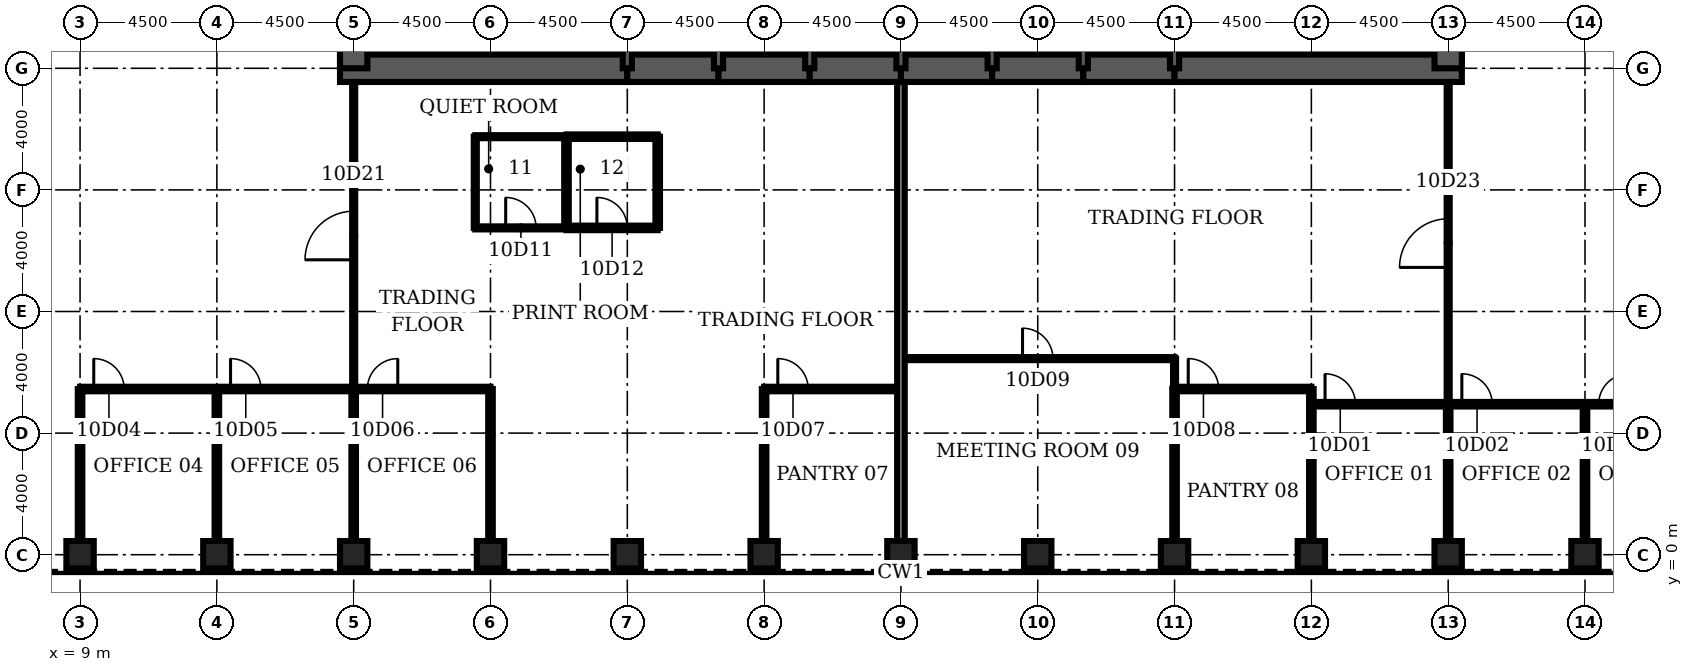
"""IFC4 building model, lengths in metres.
Left out: names, types, materials, properties, quantities, classifications, styles, units other than length and angle.
Written with IfcOpenShell. Run it as: python <this file> out.ifc"""

import sys

from ifc_helpers import new_model, si_unit, direction, frame, frame_2d, origin, origin_2d, place, context, subcontext, project, spatial, rectangle, hollow_rectangle, extrude, element, fill, save


model = new_model("IFC4")
c1 = context("Model", 3, precision=1e-05, world=origin(), true_north=direction((0.0, 1.0)))
c2 = subcontext(c1, "Body", "Model", "MODEL_VIEW")
j1 = project(units=[si_unit("LENGTHUNIT", "METRE"), si_unit("PLANEANGLEUNIT", "RADIAN")], contexts=[c1])
p1 = place(None, origin())
s1 = spatial("IfcSite", under=j1, at=p1, CompositionType="ELEMENT")
p2 = place(p1, origin())
s2 = spatial("IfcBuilding", under=s1, at=p2, CompositionType="ELEMENT")
p3 = place(p2, frame((0.0, 0.0, 50.0)))
s3 = spatial("IfcBuildingStorey", under=s2, at=p3, CompositionType="ELEMENT", Elevation=50.0)
for number, where, z_axis, x_axis in (
    (1, (9.0, 0.0, 0.0), (0.0, 0.0, 1.0), (0.0, 1.0, 0.0)),
    (2, (13.5, 0.0, 0.0), (0.0, 0.0, 1.0), (0.0, 1.0, 0.0)),
    (3, (18.0, 0.0, 0.0), (0.0, 0.0, 1.0), (0.0, 1.0, 0.0)),
    (4, (22.5, 0.0, 0.0), (0.0, 0.0, 1.0), (0.0, 1.0, 0.0)),
    (5, (27.0, 0.0, 0.0), (0.0, 0.0, 1.0), (0.0, 1.0, 0.0)),
    (6, (31.5, 0.0, 0.0), (0.0, 0.0, 1.0), (0.0, 1.0, 0.0)),
    (7, (36.0, 0.0, 0.0), (0.0, 0.0, 1.0), (0.0, 1.0, 0.0)),
    (8, (40.5, 0.0, 0.0), (0.0, 0.0, 1.0), (0.0, 1.0, 0.0)),
    (9, (45.0, 0.0, 0.0), (0.0, 0.0, 1.0), (0.0, 1.0, 0.0)),
    (10, (49.5, 0.0, 0.0), (0.0, 0.0, 1.0), (0.0, 1.0, 0.0)),
    (11, (54.0, 0.0, 0.0), (0.0, 0.0, 1.0), (0.0, 1.0, 0.0)),
    (12, (58.5, 0.0, 0.0), (0.0, 0.0, 1.0), (0.0, 1.0, 0.0)),
):
    element("IfcColumn", number, at=place(p3, frame(where, z_axis=z_axis, x_axis=x_axis)), inside=s3, PredefinedType="COLUMN", context=c2, shape_type="SweptSolid", body=[
        extrude(hollow_rectangle(XDim=0.9, YDim=0.9, WallThickness=0.12, at=origin_2d()), origin(), (0.0, 0.0, 1.0), 4.5),
    ])
p4 = place(p3, frame((17.55, 16.0, 0.0), z_axis=(0.0, 0.0, 1.0), x_axis=(1.0, 0.0, 0.0)))
e13 = element("IfcWall", 13, at=p4, inside=s3, PredefinedType="SHEAR", context=c2, shape_type="SweptSolid", body=[
    extrude(rectangle(XDim=9.45, YDim=0.9, at=frame_2d((4.725, 0.0))), origin(), (0.0, 0.0, 1.0), 4.5),
])
for number, where, z_axis, x_axis in (
    (14, (27.0, 16.0, 0.0), (0.0, 0.0, 1.0), (1.0, 0.0, 0.0)),
    (15, (30.0, 16.0, 0.0), (0.0, 0.0, 1.0), (1.0, 0.0, 0.0)),
    (16, (33.0, 16.0, 0.0), (0.0, 0.0, 1.0), (1.0, 0.0, 0.0)),
    (17, (36.0, 16.0, 0.0), (0.0, 0.0, 1.0), (1.0, 0.0, 0.0)),
    (18, (39.0, 16.0, 0.0), (0.0, 0.0, 1.0), (1.0, 0.0, 0.0)),
    (19, (42.0, 16.0, 0.0), (0.0, 0.0, 1.0), (1.0, 0.0, 0.0)),
):
    element("IfcWall", number, at=place(p3, frame(where, z_axis=z_axis, x_axis=x_axis)), inside=s3, PredefinedType="SHEAR", context=c2, shape_type="SweptSolid", body=[
        extrude(rectangle(XDim=3.0, YDim=0.9, at=frame_2d((1.5, 0.0))), origin(), (0.0, 0.0, 1.0), 4.5),
    ])
p5 = place(p3, frame((45.0, 16.0, 0.0), z_axis=(0.0, 0.0, 1.0), x_axis=(1.0, 0.0, 0.0)))
e20 = element("IfcWall", 20, at=p5, inside=s3, PredefinedType="SHEAR", context=c2, shape_type="SweptSolid", body=[
    extrude(rectangle(XDim=9.45, YDim=0.9, at=frame_2d((4.725, 0.0))), origin(), (0.0, 0.0, 1.0), 4.5),
])
for number, where, z_axis, x_axis in (
    (21, (18.0, 19.2, 0.0), (0.0, 0.0, 1.0), (0.0, -1.0, 0.0)),
    (22, (54.0, 16.0, 0.0), (0.0, 0.0, 1.0), (0.0, 1.0, 0.0)),
):
    element("IfcWall", number, at=place(p3, frame(where, z_axis=z_axis, x_axis=x_axis)), inside=s3, PredefinedType="SHEAR", context=c2, shape_type="SweptSolid", body=[
        extrude(rectangle(XDim=3.2, YDim=0.9, at=frame_2d((1.6, 0.0))), origin(), (0.0, 0.0, 1.0), 4.5),
    ])
for number, where, z_axis, x_axis in (
    (23, (27.0, 16.0, 0.0), (0.0, 0.0, 1.0), (0.0, 1.0, 0.0)),
    (24, (30.0, 16.0, 0.0), (0.0, 0.0, 1.0), (0.0, 1.0, 0.0)),
    (25, (33.0, 16.0, 0.0), (0.0, 0.0, 1.0), (0.0, 1.0, 0.0)),
    (26, (36.0, 16.0, 0.0), (0.0, 0.0, 1.0), (0.0, 1.0, 0.0)),
    (27, (39.0, 16.0, 0.0), (0.0, 0.0, 1.0), (0.0, 1.0, 0.0)),
    (28, (42.0, 16.0, 0.0), (0.0, 0.0, 1.0), (0.0, 1.0, 0.0)),
    (29, (45.0, 16.0, 0.0), (0.0, 0.0, 1.0), (0.0, 1.0, 0.0)),
):
    element("IfcWall", number, at=place(p3, frame(where, z_axis=z_axis, x_axis=x_axis)), inside=s3, PredefinedType="SOLIDWALL", context=c2, shape_type="SweptSolid", body=[
        extrude(rectangle(XDim=3.2, YDim=0.3, at=frame_2d((1.6, 0.0))), origin(), (0.0, 0.0, 1.0), 4.5),
    ])
p6 = place(p3, frame((49.5, 4.95, 0.0), z_axis=(0.0, 0.0, 1.0), x_axis=(1.0, 0.0, 0.0)))
e30 = element("IfcWall", 30, at=p6, inside=s3, PredefinedType="PARTITIONING", context=c2, shape_type="SweptSolid", body=[
    extrude(rectangle(XDim=13.5, YDim=0.15, at=frame_2d((6.75, 0.0))), origin(), (0.0, 0.0, 1.0), 3.0),
])
p7 = place(p6, frame((0.45, 0.0, 0.0)))
e31 = element("IfcOpeningElement", 31, at=p7, cuts=e30, PredefinedType="OPENING", context=c2, shape_type="SweptSolid", body=[
    extrude(rectangle(XDim=1.0, YDim=2.1, at=frame_2d((0.5, 1.05))), frame((0.0, 0.085, 0.0), z_axis=(0.0, -1.0, 0.0), x_axis=(1.0, 0.0, 0.0)), (0.0, 0.0, 1.0), 0.17),
])
p8 = place(p6, frame((4.95, 0.0, 0.0)))
e32 = element("IfcOpeningElement", 32, at=p8, cuts=e30, PredefinedType="OPENING", context=c2, shape_type="SweptSolid", body=[
    extrude(rectangle(XDim=1.0, YDim=2.1, at=frame_2d((0.5, 1.05))), frame((0.0, 0.085, 0.0), z_axis=(0.0, -1.0, 0.0), x_axis=(1.0, 0.0, 0.0)), (0.0, 0.0, 1.0), 0.17),
])
p9 = place(p6, frame((9.45, 0.0, 0.0)))
e33 = element("IfcOpeningElement", 33, at=p9, cuts=e30, PredefinedType="OPENING", context=c2, shape_type="SweptSolid", body=[
    extrude(rectangle(XDim=1.0, YDim=2.1, at=frame_2d((0.5, 1.05))), frame((0.0, 0.085, 0.0), z_axis=(0.0, -1.0, 0.0), x_axis=(1.0, 0.0, 0.0)), (0.0, 0.0, 1.0), 0.17),
])
p10 = place(p3, frame((9.0, 5.45, 0.0), z_axis=(0.0, 0.0, 1.0), x_axis=(1.0, 0.0, 0.0)))
e34 = element("IfcWall", 34, at=p10, inside=s3, PredefinedType="PARTITIONING", context=c2, shape_type="SweptSolid", body=[
    extrude(rectangle(XDim=13.5, YDim=0.15, at=frame_2d((6.75, 0.0))), origin(), (0.0, 0.0, 1.0), 3.0),
])
p11 = place(p10, frame((0.45, 0.0, 0.0)))
e35 = element("IfcOpeningElement", 35, at=p11, cuts=e34, PredefinedType="OPENING", context=c2, shape_type="SweptSolid", body=[
    extrude(rectangle(XDim=1.0, YDim=2.1, at=frame_2d((0.5, 1.05))), frame((0.0, 0.085, 0.0), z_axis=(0.0, -1.0, 0.0), x_axis=(1.0, 0.0, 0.0)), (0.0, 0.0, 1.0), 0.17),
])
p12 = place(p10, frame((4.95, 0.0, 0.0)))
e36 = element("IfcOpeningElement", 36, at=p12, cuts=e34, PredefinedType="OPENING", context=c2, shape_type="SweptSolid", body=[
    extrude(rectangle(XDim=1.0, YDim=2.1, at=frame_2d((0.5, 1.05))), frame((0.0, 0.085, 0.0), z_axis=(0.0, -1.0, 0.0), x_axis=(1.0, 0.0, 0.0)), (0.0, 0.0, 1.0), 0.17),
])
p13 = place(p10, frame((9.45, 0.0, 0.0)))
e37 = element("IfcOpeningElement", 37, at=p13, cuts=e34, PredefinedType="OPENING", context=c2, shape_type="SweptSolid", body=[
    extrude(rectangle(XDim=1.0, YDim=2.1, at=frame_2d((0.5, 1.05))), frame((0.0, 0.085, 0.0), z_axis=(0.0, -1.0, 0.0), x_axis=(1.0, 0.0, 0.0)), (0.0, 0.0, 1.0), 0.17),
])
p14 = place(p3, frame((31.5, 5.45, 0.0), z_axis=(0.0, 0.0, 1.0), x_axis=(1.0, 0.0, 0.0)))
e38 = element("IfcWall", 38, at=p14, inside=s3, PredefinedType="PARTITIONING", context=c2, shape_type="SweptSolid", body=[
    extrude(rectangle(XDim=4.5, YDim=0.15, at=frame_2d((2.25, 0.0))), origin(), (0.0, 0.0, 1.0), 3.0),
])
p15 = place(p14, frame((0.45, 0.0, 0.0)))
e39 = element("IfcOpeningElement", 39, at=p15, cuts=e38, PredefinedType="OPENING", context=c2, shape_type="SweptSolid", body=[
    extrude(rectangle(XDim=1.0, YDim=2.1, at=frame_2d((0.5, 1.05))), frame((0.0, 0.085, 0.0), z_axis=(0.0, -1.0, 0.0), x_axis=(1.0, 0.0, 0.0)), (0.0, 0.0, 1.0), 0.17),
])
p16 = place(p3, frame((45.0, 5.45, 0.0), z_axis=(0.0, 0.0, 1.0), x_axis=(1.0, 0.0, 0.0)))
e40 = element("IfcWall", 40, at=p16, inside=s3, PredefinedType="PARTITIONING", context=c2, shape_type="SweptSolid", body=[
    extrude(rectangle(XDim=4.5, YDim=0.15, at=frame_2d((2.25, 0.0))), origin(), (0.0, 0.0, 1.0), 3.0),
])
p17 = place(p16, frame((0.45, 0.0, 0.0)))
e41 = element("IfcOpeningElement", 41, at=p17, cuts=e40, PredefinedType="OPENING", context=c2, shape_type="SweptSolid", body=[
    extrude(rectangle(XDim=1.0, YDim=2.1, at=frame_2d((0.5, 1.05))), frame((0.0, 0.085, 0.0), z_axis=(0.0, -1.0, 0.0), x_axis=(1.0, 0.0, 0.0)), (0.0, 0.0, 1.0), 0.17),
])
p18 = place(p3, frame((36.0, 6.45, 0.0), z_axis=(0.0, 0.0, 1.0), x_axis=(1.0, 0.0, 0.0)))
e42 = element("IfcWall", 42, at=p18, inside=s3, PredefinedType="PARTITIONING", context=c2, shape_type="SweptSolid", body=[
    extrude(rectangle(XDim=9.0, YDim=0.1, at=frame_2d((4.5, 0.0))), origin(), (0.0, 0.0, 1.0), 3.0),
])
p19 = place(p18, frame((4.0, 0.0, 0.0)))
e43 = element("IfcOpeningElement", 43, at=p19, cuts=e42, PredefinedType="OPENING", context=c2, shape_type="SweptSolid", body=[
    extrude(rectangle(XDim=1.0, YDim=2.1, at=frame_2d((0.5, 1.05))), frame((0.0, 0.06, 0.0), z_axis=(0.0, -1.0, 0.0), x_axis=(1.0, 0.0, 0.0)), (0.0, 0.0, 1.0), 0.12),
])
p20 = place(p3, frame((22.0, 10.75, 0.0), z_axis=(0.0, 0.0, 1.0), x_axis=(1.0, 0.0, 0.0)))
e44 = element("IfcWall", 44, at=p20, inside=s3, PredefinedType="PARTITIONING", context=c2, shape_type="SweptSolid", body=[
    extrude(rectangle(XDim=3.0, YDim=0.1, at=frame_2d((1.5, 0.0))), origin(), (0.0, 0.0, 1.0), 3.0),
])
p21 = place(p20, frame((1.0, 0.0, 0.0)))
e45 = element("IfcOpeningElement", 45, at=p21, cuts=e44, PredefinedType="OPENING", context=c2, shape_type="SweptSolid", body=[
    extrude(rectangle(XDim=1.0, YDim=2.1, at=frame_2d((0.5, 1.05))), frame((0.0, 0.06, 0.0), z_axis=(0.0, -1.0, 0.0), x_axis=(1.0, 0.0, 0.0)), (0.0, 0.0, 1.0), 0.12),
])
p22 = place(p3, frame((25.0, 10.75, 0.0), z_axis=(0.0, 0.0, 1.0), x_axis=(1.0, 0.0, 0.0)))
e46 = element("IfcWall", 46, at=p22, inside=s3, PredefinedType="PARTITIONING", context=c2, shape_type="SweptSolid", body=[
    extrude(rectangle(XDim=3.0, YDim=0.15, at=frame_2d((1.5, 0.0))), origin(), (0.0, 0.0, 1.0), 3.0),
])
p23 = place(p22, frame((1.0, 0.0, 0.0)))
e47 = element("IfcOpeningElement", 47, at=p23, cuts=e46, PredefinedType="OPENING", context=c2, shape_type="SweptSolid", body=[
    extrude(rectangle(XDim=1.0, YDim=2.1, at=frame_2d((0.5, 1.05))), frame((0.0, 0.085, 0.0), z_axis=(0.0, -1.0, 0.0), x_axis=(1.0, 0.0, 0.0)), (0.0, 0.0, 1.0), 0.17),
])
p24 = place(p3, frame((22.0, 13.75, 0.0), z_axis=(0.0, 0.0, 1.0), x_axis=(1.0, 0.0, 0.0)))
e48 = element("IfcWall", 48, at=p24, inside=s3, PredefinedType="PARTITIONING", context=c2, shape_type="SweptSolid", body=[
    extrude(rectangle(XDim=3.0, YDim=0.1, at=frame_2d((1.5, 0.0))), origin(), (0.0, 0.0, 1.0), 3.0),
])
p25 = place(p3, frame((25.0, 13.75, 0.0), z_axis=(0.0, 0.0, 1.0), x_axis=(1.0, 0.0, 0.0)))
e49 = element("IfcWall", 49, at=p25, inside=s3, PredefinedType="PARTITIONING", context=c2, shape_type="SweptSolid", body=[
    extrude(rectangle(XDim=3.0, YDim=0.15, at=frame_2d((1.5, 0.0))), origin(), (0.0, 0.0, 1.0), 3.0),
])
for number, where, z_axis, x_axis in (
    (50, (9.0, 0.45, 0.0), (0.0, 0.0, 1.0), (0.0, 1.0, 0.0)),
    (51, (13.5, 0.45, 0.0), (0.0, 0.0, 1.0), (0.0, 1.0, 0.0)),
    (52, (18.0, 0.45, 0.0), (0.0, 0.0, 1.0), (0.0, 1.0, 0.0)),
):
    element("IfcWall", number, at=place(p3, frame(where, z_axis=z_axis, x_axis=x_axis)), inside=s3, PredefinedType="PARTITIONING", context=c2, shape_type="SweptSolid", body=[
        extrude(rectangle(XDim=5.0, YDim=0.15, at=frame_2d((2.5, 0.0))), origin(), (0.0, 0.0, 1.0), 3.0),
    ])
p26 = place(p3, frame((18.0, 5.45, 0.0), z_axis=(0.0, 0.0, 1.0), x_axis=(0.0, 1.0, 0.0)))
e53 = element("IfcWall", 53, at=p26, inside=s3, PredefinedType="PARTITIONING", context=c2, shape_type="SweptSolid", body=[
    extrude(rectangle(XDim=10.1, YDim=0.1, at=frame_2d((5.05, 0.0))), origin(), (0.0, 0.0, 1.0), 3.0),
])
p27 = place(p26, frame((4.25, 0.0, 0.0)))
e54 = element("IfcOpeningElement", 54, at=p27, cuts=e53, PredefinedType="OPENING", context=c2, shape_type="SweptSolid", body=[
    extrude(rectangle(XDim=1.6, YDim=2.1, at=frame_2d((0.8, 1.05))), frame((0.0, 0.06, 0.0), z_axis=(0.0, -1.0, 0.0), x_axis=(1.0, 0.0, 0.0)), (0.0, 0.0, 1.0), 0.12),
])
p28 = place(p3, frame((22.0, 10.75, 0.0), z_axis=(0.0, 0.0, 1.0), x_axis=(0.0, 1.0, 0.0)))
e55 = element("IfcWall", 55, at=p28, inside=s3, PredefinedType="PARTITIONING", context=c2, shape_type="SweptSolid", body=[
    extrude(rectangle(XDim=3.0, YDim=0.1, at=frame_2d((1.5, 0.0))), origin(), (0.0, 0.0, 1.0), 3.0),
])
p29 = place(p3, frame((22.5, 0.45, 0.0), z_axis=(0.0, 0.0, 1.0), x_axis=(0.0, 1.0, 0.0)))
e56 = element("IfcWall", 56, at=p29, inside=s3, PredefinedType="PARTITIONING", context=c2, shape_type="SweptSolid", body=[
    extrude(rectangle(XDim=5.0, YDim=0.15, at=frame_2d((2.5, 0.0))), origin(), (0.0, 0.0, 1.0), 3.0),
])
for number, where, z_axis, x_axis in (
    (57, (25.0, 10.75, 0.0), (0.0, 0.0, 1.0), (0.0, 1.0, 0.0)),
    (58, (28.0, 10.75, 0.0), (0.0, 0.0, 1.0), (0.0, 1.0, 0.0)),
):
    element("IfcWall", number, at=place(p3, frame(where, z_axis=z_axis, x_axis=x_axis)), inside=s3, PredefinedType="PARTITIONING", context=c2, shape_type="SweptSolid", body=[
        extrude(rectangle(XDim=3.0, YDim=0.15, at=frame_2d((1.5, 0.0))), origin(), (0.0, 0.0, 1.0), 3.0),
    ])
p30 = place(p3, frame((31.5, 0.45, 0.0), z_axis=(0.0, 0.0, 1.0), x_axis=(0.0, 1.0, 0.0)))
e59 = element("IfcWall", 59, at=p30, inside=s3, PredefinedType="PARTITIONING", context=c2, shape_type="SweptSolid", body=[
    extrude(rectangle(XDim=5.0, YDim=0.15, at=frame_2d((2.5, 0.0))), origin(), (0.0, 0.0, 1.0), 3.0),
])
p31 = place(p3, frame((36.0, 0.45, 0.0), z_axis=(0.0, 0.0, 1.0), x_axis=(0.0, 1.0, 0.0)))
e60 = element("IfcWall", 60, at=p31, inside=s3, PredefinedType="PARTITIONING", context=c2, shape_type="SweptSolid", body=[
    extrude(rectangle(XDim=15.1, YDim=0.25, at=frame_2d((7.55, 0.0))), origin(), (0.0, 0.0, 1.0), 3.0),
])
p32 = place(p3, frame((45.0, 0.45, 0.0), z_axis=(0.0, 0.0, 1.0), x_axis=(0.0, 1.0, 0.0)))
e61 = element("IfcWall", 61, at=p32, inside=s3, PredefinedType="PARTITIONING", context=c2, shape_type="SweptSolid", body=[
    extrude(rectangle(XDim=5.0, YDim=0.15, at=frame_2d((2.5, 0.0))), origin(), (0.0, 0.0, 1.0), 3.0),
])
p33 = place(p3, frame((45.0, 5.45, 0.0), z_axis=(0.0, 0.0, 1.0), x_axis=(0.0, 1.0, 0.0)))
e62 = element("IfcWall", 62, at=p33, inside=s3, PredefinedType="PARTITIONING", context=c2, shape_type="SweptSolid", body=[
    extrude(rectangle(XDim=1.0, YDim=0.1, at=frame_2d((0.5, 0.0))), origin(), (0.0, 0.0, 1.0), 3.0),
])
p34 = place(p3, frame((49.5, 0.45, 0.0), z_axis=(0.0, 0.0, 1.0), x_axis=(0.0, 1.0, 0.0)))
e63 = element("IfcWall", 63, at=p34, inside=s3, PredefinedType="PARTITIONING", context=c2, shape_type="SweptSolid", body=[
    extrude(rectangle(XDim=5.0, YDim=0.15, at=frame_2d((2.5, 0.0))), origin(), (0.0, 0.0, 1.0), 3.0),
])
p35 = place(p3, frame((54.0, 0.45, 0.0), z_axis=(0.0, 0.0, 1.0), x_axis=(0.0, 1.0, 0.0)))
e64 = element("IfcWall", 64, at=p35, inside=s3, PredefinedType="PARTITIONING", context=c2, shape_type="SweptSolid", body=[
    extrude(rectangle(XDim=4.5, YDim=0.15, at=frame_2d((2.25, 0.0))), origin(), (0.0, 0.0, 1.0), 3.0),
])
p36 = place(p3, frame((54.0, 4.95, 0.0), z_axis=(0.0, 0.0, 1.0), x_axis=(0.0, 1.0, 0.0)))
e65 = element("IfcWall", 65, at=p36, inside=s3, PredefinedType="PARTITIONING", context=c2, shape_type="SweptSolid", body=[
    extrude(rectangle(XDim=10.6, YDim=0.1, at=frame_2d((5.3, 0.0))), origin(), (0.0, 0.0, 1.0), 3.0),
])
p37 = place(p36, frame((4.5, 0.0, 0.0)))
e66 = element("IfcOpeningElement", 66, at=p37, cuts=e65, PredefinedType="OPENING", context=c2, shape_type="SweptSolid", body=[
    extrude(rectangle(XDim=1.6, YDim=2.1, at=frame_2d((0.8, 1.05))), frame((0.0, 0.06, 0.0), z_axis=(0.0, -1.0, 0.0), x_axis=(1.0, 0.0, 0.0)), (0.0, 0.0, 1.0), 0.12),
])
p38 = place(p3, frame((58.5, 0.45, 0.0), z_axis=(0.0, 0.0, 1.0), x_axis=(0.0, 1.0, 0.0)))
e67 = element("IfcWall", 67, at=p38, inside=s3, PredefinedType="PARTITIONING", context=c2, shape_type="SweptSolid", body=[
    extrude(rectangle(XDim=4.5, YDim=0.15, at=frame_2d((2.25, 0.0))), origin(), (0.0, 0.0, 1.0), 3.0),
])
p39 = place(p7, origin())
e68 = element("IfcDoor", 68, at=p39, inside=s3, OperationType="SINGLE_SWING_LEFT", PredefinedType="DOOR", context=c2, shape_type="SweptSolid", body=[
    extrude(rectangle(XDim=1.0, YDim=2.1, at=frame_2d((0.5, 1.05))), frame((0.0, 0.025, 0.0), z_axis=(0.0, -1.0, 0.0), x_axis=(1.0, 0.0, 0.0)), (0.0, 0.0, 1.0), 0.05),
])
fill(e31, e68)
p40 = place(p8, origin())
e69 = element("IfcDoor", 69, at=p40, inside=s3, OperationType="SINGLE_SWING_LEFT", PredefinedType="DOOR", context=c2, shape_type="SweptSolid", body=[
    extrude(rectangle(XDim=1.0, YDim=2.1, at=frame_2d((0.5, 1.05))), frame((0.0, 0.025, 0.0), z_axis=(0.0, -1.0, 0.0), x_axis=(1.0, 0.0, 0.0)), (0.0, 0.0, 1.0), 0.05),
])
fill(e32, e69)
p41 = place(p9, origin())
e70 = element("IfcDoor", 70, at=p41, inside=s3, OperationType="SINGLE_SWING_RIGHT", PredefinedType="DOOR", context=c2, shape_type="SweptSolid", body=[
    extrude(rectangle(XDim=1.0, YDim=2.1, at=frame_2d((0.5, 1.05))), frame((0.0, 0.025, 0.0), z_axis=(0.0, -1.0, 0.0), x_axis=(1.0, 0.0, 0.0)), (0.0, 0.0, 1.0), 0.05),
])
fill(e33, e70)
p42 = place(p11, origin())
e71 = element("IfcDoor", 71, at=p42, inside=s3, OperationType="SINGLE_SWING_LEFT", PredefinedType="DOOR", context=c2, shape_type="SweptSolid", body=[
    extrude(rectangle(XDim=1.0, YDim=2.1, at=frame_2d((0.5, 1.05))), frame((0.0, 0.025, 0.0), z_axis=(0.0, -1.0, 0.0), x_axis=(1.0, 0.0, 0.0)), (0.0, 0.0, 1.0), 0.05),
])
fill(e35, e71)
p43 = place(p12, origin())
e72 = element("IfcDoor", 72, at=p43, inside=s3, OperationType="SINGLE_SWING_LEFT", PredefinedType="DOOR", context=c2, shape_type="SweptSolid", body=[
    extrude(rectangle(XDim=1.0, YDim=2.1, at=frame_2d((0.5, 1.05))), frame((0.0, 0.025, 0.0), z_axis=(0.0, -1.0, 0.0), x_axis=(1.0, 0.0, 0.0)), (0.0, 0.0, 1.0), 0.05),
])
fill(e36, e72)
p44 = place(p13, origin())
e73 = element("IfcDoor", 73, at=p44, inside=s3, OperationType="SINGLE_SWING_RIGHT", PredefinedType="DOOR", context=c2, shape_type="SweptSolid", body=[
    extrude(rectangle(XDim=1.0, YDim=2.1, at=frame_2d((0.5, 1.05))), frame((0.0, 0.025, 0.0), z_axis=(0.0, -1.0, 0.0), x_axis=(1.0, 0.0, 0.0)), (0.0, 0.0, 1.0), 0.05),
])
fill(e37, e73)
p45 = place(p15, origin())
e74 = element("IfcDoor", 74, at=p45, inside=s3, OperationType="SINGLE_SWING_LEFT", PredefinedType="DOOR", context=c2, shape_type="SweptSolid", body=[
    extrude(rectangle(XDim=1.0, YDim=2.1, at=frame_2d((0.5, 1.05))), frame((0.0, 0.025, 0.0), z_axis=(0.0, -1.0, 0.0), x_axis=(1.0, 0.0, 0.0)), (0.0, 0.0, 1.0), 0.05),
])
fill(e39, e74)
p46 = place(p17, origin())
e75 = element("IfcDoor", 75, at=p46, inside=s3, OperationType="SINGLE_SWING_LEFT", PredefinedType="DOOR", context=c2, shape_type="SweptSolid", body=[
    extrude(rectangle(XDim=1.0, YDim=2.1, at=frame_2d((0.5, 1.05))), frame((0.0, 0.025, 0.0), z_axis=(0.0, -1.0, 0.0), x_axis=(1.0, 0.0, 0.0)), (0.0, 0.0, 1.0), 0.05),
])
fill(e41, e75)
p47 = place(p19, origin())
e76 = element("IfcDoor", 76, at=p47, inside=s3, OperationType="SINGLE_SWING_LEFT", PredefinedType="DOOR", context=c2, shape_type="SweptSolid", body=[
    extrude(rectangle(XDim=1.0, YDim=2.1, at=frame_2d((0.5, 1.05))), frame((0.0, 0.025, 0.0), z_axis=(0.0, -1.0, 0.0), x_axis=(1.0, 0.0, 0.0)), (0.0, 0.0, 1.0), 0.05),
])
fill(e43, e76)
p48 = place(p21, origin())
e77 = element("IfcDoor", 77, at=p48, inside=s3, OperationType="SINGLE_SWING_LEFT", PredefinedType="DOOR", context=c2, shape_type="SweptSolid", body=[
    extrude(rectangle(XDim=1.0, YDim=2.1, at=frame_2d((0.5, 1.05))), frame((0.0, 0.025, 0.0), z_axis=(0.0, -1.0, 0.0), x_axis=(1.0, 0.0, 0.0)), (0.0, 0.0, 1.0), 0.05),
])
fill(e45, e77)
p49 = place(p23, origin())
e78 = element("IfcDoor", 78, at=p49, inside=s3, OperationType="SINGLE_SWING_LEFT", PredefinedType="DOOR", context=c2, shape_type="SweptSolid", body=[
    extrude(rectangle(XDim=1.0, YDim=2.1, at=frame_2d((0.5, 1.05))), frame((0.0, 0.025, 0.0), z_axis=(0.0, -1.0, 0.0), x_axis=(1.0, 0.0, 0.0)), (0.0, 0.0, 1.0), 0.05),
])
fill(e47, e78)
p50 = place(p27, origin())
e79 = element("IfcDoor", 79, at=p50, inside=s3, OperationType="SINGLE_SWING_LEFT", PredefinedType="DOOR", context=c2, shape_type="SweptSolid", body=[
    extrude(rectangle(XDim=1.6, YDim=2.1, at=frame_2d((0.8, 1.05))), frame((0.0, 0.025, 0.0), z_axis=(0.0, -1.0, 0.0), x_axis=(1.0, 0.0, 0.0)), (0.0, 0.0, 1.0), 0.05),
])
fill(e54, e79)
p51 = place(p37, origin())
e80 = element("IfcDoor", 80, at=p51, inside=s3, OperationType="SINGLE_SWING_LEFT", PredefinedType="DOOR", context=c2, shape_type="SweptSolid", body=[
    extrude(rectangle(XDim=1.6, YDim=2.1, at=frame_2d((0.8, 1.05))), frame((0.0, 0.025, 0.0), z_axis=(0.0, -1.0, 0.0), x_axis=(1.0, 0.0, 0.0)), (0.0, 0.0, 1.0), 0.05),
])
fill(e66, e80)
save(model, sys.argv[1])
